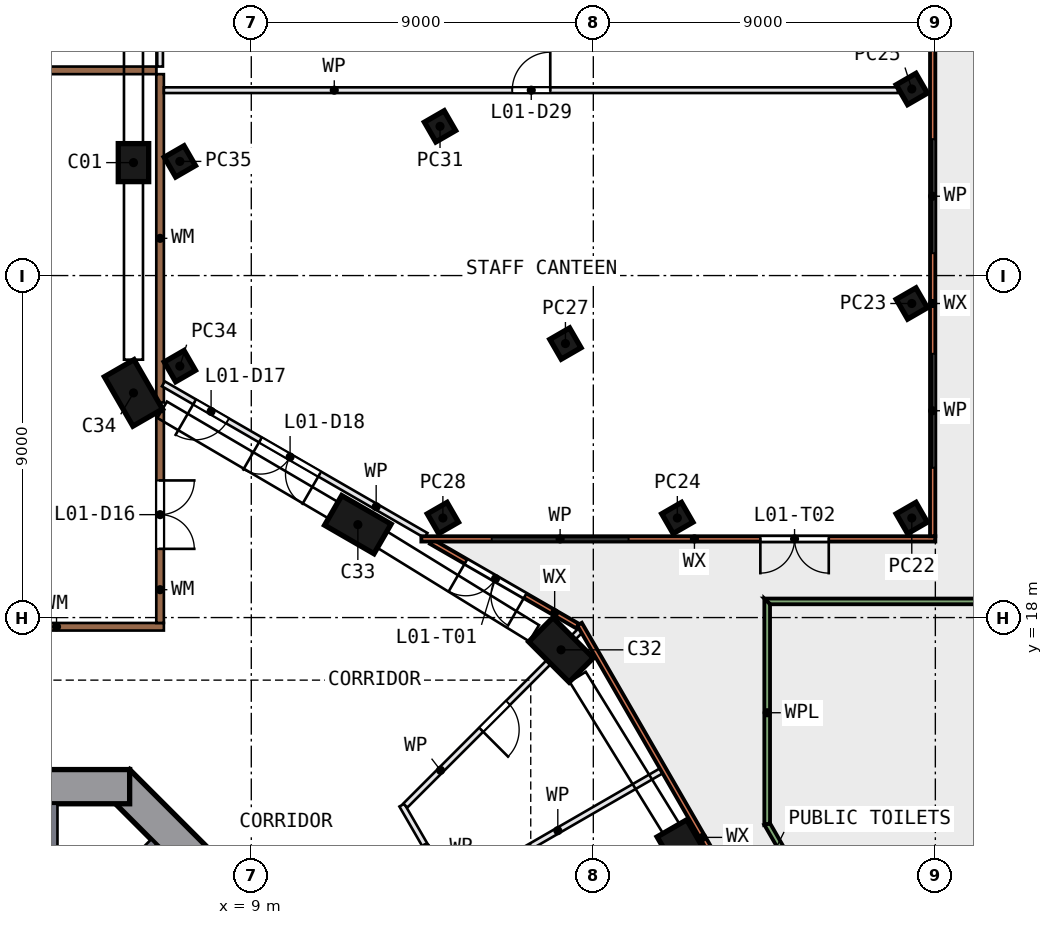
"""IFC4 building model, lengths in metres.
Left out: names, types, materials, properties, quantities, classifications, styles, units other than length and angle.
Written with IfcOpenShell. Run it as: python <this file> out.ifc"""

import sys

from ifc_helpers import new_model, si_unit, direction, frame, frame_2d, origin, origin_2d, place, context, subcontext, project, spatial, polyline, rectangle, outline, extrude, element, fill, save


model = new_model("IFC4")
c1 = context("Model", 3, precision=1e-05, world=origin(), true_north=direction((0.0, 1.0)))
c2 = subcontext(c1, "Body", "Model", "MODEL_VIEW")
j1 = project(units=[si_unit("LENGTHUNIT", "METRE"), si_unit("PLANEANGLEUNIT", "RADIAN")], contexts=[c1])
p1 = place(None, origin())
s1 = spatial("IfcSite", under=j1, at=p1, CompositionType="ELEMENT")
p2 = place(p1, origin())
s2 = spatial("IfcBuilding", under=s1, at=p2, CompositionType="ELEMENT")
p3 = place(p2, frame((0.0, 0.0, 8.0)))
s3 = spatial("IfcBuildingStorey", under=s2, at=p3, CompositionType="ELEMENT", Elevation=8.0)
p4 = place(p3, frame((5.9, 29.972, 0.0), z_axis=(0.0, 0.0, 1.0), x_axis=(0.0, 1.0, 0.0)))
e1 = element("IfcColumn", 1, at=p4, inside=s3, PredefinedType="COLUMN", context=c2, shape_type="SweptSolid", body=[
    extrude(rectangle(XDim=1.0, YDim=0.8, at=origin_2d()), origin(), (0.0, 0.0, 1.0), 5.55),
])
for number, where, z_axis, x_axis in (
    (2, (20.445, 11.804, 0.0), (0.0, 0.0, 1.0), (-0.5, 0.866, 0.0)),
    (3, (17.151, 17.151, 0.0), (0.0, 0.0, 1.0), (0.707, -0.707, 0.0)),
    (4, (11.804, 20.445, 0.0), (0.0, 0.0, 1.0), (-0.866, 0.5, 0.0)),
    (5, (5.9, 23.912, 0.0), (0.0, 0.0, 1.0), (0.5, -0.866, 0.0)),
):
    element("IfcColumn", number, at=place(p3, frame(where, z_axis=z_axis, x_axis=x_axis)), inside=s3, PredefinedType="COLUMN", context=c2, shape_type="SweptSolid", body=[
        extrude(rectangle(XDim=1.5, YDim=0.9, at=origin_2d()), origin(), (0.0, 0.0, 1.0), 5.55),
    ])
p5 = place(p3, frame((13.682, 5.481, 0.0), z_axis=(0.0, 0.0, 1.0), x_axis=(-0.707106781, 0.707106781, 0.0)))
e6 = element("IfcWall", 6, at=p5, inside=s3, PredefinedType="SHEAR", context=c2, shape_type="SweptSolid", body=[
    extrude(rectangle(XDim=11.598, YDim=0.9, at=frame_2d((5.799, 0.0))), origin(), (0.0, 0.0, 1.0), 6.0),
])
p6 = place(p5, frame((2.099, 0.0, 0.0)))
e7 = element("IfcOpeningElement", 7, at=p6, cuts=e6, PredefinedType="OPENING", context=c2, shape_type="SweptSolid", body=[
    extrude(rectangle(XDim=1.2, YDim=2.1, at=frame_2d((0.6, 1.05))), frame((0.0, 0.46, 0.0), z_axis=(0.0, -1.0, 0.0), x_axis=(1.0, 0.0, 0.0)), (0.0, 0.0, 1.0), 0.92),
])
p7 = place(p3, frame((5.799, 13.55, 0.0), z_axis=(0.0, 0.0, 1.0), x_axis=(-1.0, 0.0, 0.0)))
e8 = element("IfcWall", 8, at=p7, inside=s3, PredefinedType="SHEAR", context=c2, shape_type="SweptSolid", body=[
    extrude(rectangle(XDim=11.598, YDim=0.9, at=frame_2d((5.799, 0.0))), origin(), (0.0, 0.0, 1.0), 6.0),
])
p8 = place(p7, frame((4.899, 0.0, 0.0)))
e9 = element("IfcOpeningElement", 9, at=p8, cuts=e8, PredefinedType="OPENING", context=c2, shape_type="SweptSolid", body=[
    extrude(rectangle(XDim=1.8, YDim=2.1, at=frame_2d((0.9, 1.05))), frame((0.0, 0.46, 0.0), z_axis=(0.0, -1.0, 0.0), x_axis=(1.0, 0.0, 0.0)), (0.0, 0.0, 1.0), 0.92),
])
for number, where, z_axis, x_axis in (
    (10, (26.38, 20.62, 0.0), (0.0, 0.0, 1.0), (0.866, 0.5, 0.0)),
    (11, (26.38, 26.265, 0.0), (0.0, 0.0, 1.0), (0.866, 0.5, 0.0)),
    (12, (20.211, 20.62, 0.0), (0.0, 0.0, 1.0), (0.866, 0.5, 0.0)),
    (13, (26.38, 31.91, 0.0), (0.0, 0.0, 1.0), (0.866, 0.5, 0.0)),
    (14, (17.266, 25.211, 0.0), (0.0, 0.0, 1.0), (0.866, 0.5, 0.0)),
    (15, (14.042, 20.62, 0.0), (0.0, 0.0, 1.0), (0.866, 0.5, 0.0)),
    (16, (13.966, 30.927, 0.0), (0.0, 0.0, 1.0), (0.866, 0.5, 0.0)),
    (17, (7.12, 24.616, 0.0), (0.0, 0.0, 1.0), (0.866, 0.5, 0.0)),
    (18, (7.12, 30.004, 0.0), (0.0, 0.0, 1.0), (0.866, 0.5, 0.0)),
):
    element("IfcColumn", number, at=place(p3, frame(where, z_axis=z_axis, x_axis=x_axis)), inside=s3, PredefinedType="COLUMN", context=c2, shape_type="SweptSolid", body=[
        extrude(rectangle(XDim=0.6, YDim=0.6, at=origin_2d()), origin(), (0.0, 0.0, 1.0), 6.0),
    ])
p9 = place(p3, frame((24.118, 6.603, 0.0), z_axis=(0.0, 0.0, 1.0), x_axis=(-0.499997984, 0.866026568, 0.0)))
e19 = element("IfcWall", 19, at=p9, inside=s3, PredefinedType="SOLIDWALL", context=c2, shape_type="SweptSolid", body=[
    extrude(rectangle(XDim=12.962, YDim=0.14, at=frame_2d((6.481, 0.0))), origin(), (0.0, 0.0, 1.0), 5.55),
])
p10 = place(p3, frame((17.586, 17.777, 0.0), z_axis=(0.0, 0.0, 1.0), x_axis=(-0.866020975, 0.500007671, 0.0)))
e20 = element("IfcWall", 20, at=p10, inside=s3, PredefinedType="SOLIDWALL", context=c2, shape_type="SweptSolid", body=[
    extrude(rectangle(XDim=4.446, YDim=0.14, at=frame_2d((2.223, 0.0))), origin(), (0.0, 0.0, 1.0), 5.55),
])
p11 = place(p10, frame((1.593, 0.0, 0.0)))
e21 = element("IfcOpeningElement", 21, at=p11, cuts=e20, PredefinedType="OPENING", context=c2, shape_type="SweptSolid", body=[
    extrude(rectangle(XDim=1.8, YDim=2.4, at=frame_2d((0.9, 1.2))), frame((0.0, 0.08, 0.0), z_axis=(0.0, -1.0, 0.0), x_axis=(1.0, 0.0, 0.0)), (0.0, 0.0, 1.0), 0.16),
])
p12 = place(p3, frame((27.0, 20.07, 0.0), z_axis=(0.0, 0.0, 1.0), x_axis=(-1.0, 0.0, 0.0)))
e22 = element("IfcWall", 22, at=p12, inside=s3, PredefinedType="SOLIDWALL", context=c2, shape_type="SweptSolid", body=[
    extrude(rectangle(XDim=13.526, YDim=0.14, at=frame_2d((6.763, 0.0))), origin(), (0.0, 0.0, 1.0), 5.55),
])
p13 = place(p12, frame((8.073, 0.0, 0.9)))
e23 = element("IfcOpeningElement", 23, at=p13, cuts=e22, PredefinedType="OPENING", context=c2, shape_type="SweptSolid", body=[
    extrude(rectangle(XDim=3.6, YDim=3.6, at=frame_2d((1.8, 1.8))), frame((0.0, 0.08, 0.0), z_axis=(0.0, -1.0, 0.0), x_axis=(1.0, 0.0, 0.0)), (0.0, 0.0, 1.0), 0.16),
])
p14 = place(p12, frame((2.805, 0.0, 0.0)))
e24 = element("IfcOpeningElement", 24, at=p14, cuts=e22, PredefinedType="OPENING", context=c2, shape_type="SweptSolid", body=[
    extrude(rectangle(XDim=1.8, YDim=2.4, at=frame_2d((0.9, 1.2))), frame((0.0, 0.08, 0.0), z_axis=(0.0, -1.0, 0.0), x_axis=(1.0, 0.0, 0.0)), (0.0, 0.0, 1.0), 0.16),
])
p15 = place(p3, frame((26.93, 20.14, 0.0), z_axis=(0.0, 0.0, 1.0), x_axis=(0.0, 1.0, 0.0)))
e25 = element("IfcWall", 25, at=p15, inside=s3, PredefinedType="SOLIDWALL", context=c2, shape_type="SweptSolid", body=[
    extrude(rectangle(XDim=17.786, YDim=0.14, at=frame_2d((8.893, 0.0))), origin(), (0.0, 0.0, 1.0), 5.55),
])
p16 = place(p15, frame((1.802, 0.0, 0.9)))
e26 = element("IfcOpeningElement", 26, at=p16, cuts=e25, PredefinedType="OPENING", context=c2, shape_type="SweptSolid", body=[
    extrude(rectangle(XDim=3.0, YDim=3.6, at=frame_2d((1.5, 1.8))), frame((0.0, 0.08, 0.0), z_axis=(0.0, -1.0, 0.0), x_axis=(1.0, 0.0, 0.0)), (0.0, 0.0, 1.0), 0.16),
])
p17 = place(p15, frame((7.448, 0.0, 0.9)))
e27 = element("IfcOpeningElement", 27, at=p17, cuts=e25, PredefinedType="OPENING", context=c2, shape_type="SweptSolid", body=[
    extrude(rectangle(XDim=3.0, YDim=3.6, at=frame_2d((1.5, 1.8))), frame((0.0, 0.08, 0.0), z_axis=(0.0, -1.0, 0.0), x_axis=(1.0, 0.0, 0.0)), (0.0, 0.0, 1.0), 0.16),
])
p18 = place(p15, frame((13.092, 0.0, 0.9)))
e28 = element("IfcOpeningElement", 28, at=p18, cuts=e25, PredefinedType="OPENING", context=c2, shape_type="SweptSolid", body=[
    extrude(rectangle(XDim=3.0, YDim=3.6, at=frame_2d((1.5, 1.8))), frame((0.0, 0.08, 0.0), z_axis=(0.0, -1.0, 0.0), x_axis=(1.0, 0.0, 0.0)), (0.0, 0.0, 1.0), 0.16),
])
p19 = place(p3, origin())
e29 = element("IfcWall", 29, at=p19, inside=s3, PredefinedType="SOLIDWALL", context=c2, shape_type="SweptSolid", body=[
    extrude(outline(polyline([(22.5, 12.545), (23.104, 11.5), (23.19, 11.65), (22.65, 12.586), (22.5, 12.545)])), origin(), (0.0, 0.0, 1.0), 0.6),
])
p20 = place(p3, origin())
e30 = element("IfcWall", 30, at=p20, inside=s3, PredefinedType="SOLIDWALL", context=c2, shape_type="SweptSolid", body=[
    extrude(outline(polyline([(28.5, 18.5), (22.5, 18.5), (22.65, 18.35), (28.65, 18.35), (28.5, 18.5)])), origin(), (0.0, 0.0, 1.0), 0.6),
])
p21 = place(p3, origin())
e31 = element("IfcWall", 31, at=p21, inside=s3, PredefinedType="SOLIDWALL", context=c2, shape_type="SweptSolid", body=[
    extrude(outline(polyline([(22.5, 18.5), (22.5, 12.545), (22.65, 12.586), (22.65, 18.35), (22.5, 18.5)])), origin(), (0.0, 0.0, 1.0), 0.6),
])
p22 = place(p3, origin())
e32 = element("IfcWall", 32, at=p22, inside=s3, PredefinedType="SOLIDWALL", context=c2, shape_type="SweptSolid", body=[
    extrude(outline(polyline([(3.9, 13.1), (3.9, 10.9), (3.7, 10.9), (3.7, 12.9), (1.4, 12.9), (1.4, 10.9), (1.2, 10.9), (1.2, 13.1), (3.9, 13.1)])), origin(), (0.0, 0.0, 1.0), 5.55),
])
p23 = place(p3, frame((3.677, 9.334, 0.0), z_axis=(0.0, 0.0, 1.0), x_axis=(0.707106781, 0.707106781, 0.0)))
e33 = element("IfcWall", 33, at=p23, inside=s3, PredefinedType="SOLIDWALL", context=c2, shape_type="SweptSolid", body=[
    extrude(rectangle(XDim=3.9, YDim=0.2, at=frame_2d((1.95, 0.0))), origin(), (0.0, 0.0, 1.0), 5.55),
])
p24 = place(p3, frame((6.7, 17.758, 0.0), z_axis=(0.0, 0.0, 1.0), x_axis=(-1.0, 0.0, 0.0)))
e34 = element("IfcWall", 34, at=p24, inside=s3, PredefinedType="SOLIDWALL", context=c2, shape_type="SweptSolid", body=[
    extrude(rectangle(XDim=13.2, YDim=0.2, at=frame_2d((6.6, 0.0))), origin(), (0.0, 0.0, 1.0), 5.55),
])
p25 = place(p24, frame((5.85, 0.0, 0.0)))
e35 = element("IfcOpeningElement", 35, at=p25, cuts=e34, PredefinedType="OPENING", context=c2, shape_type="SweptSolid", body=[
    extrude(rectangle(XDim=1.8, YDim=2.1, at=frame_2d((0.9, 1.05))), frame((0.0, 0.11, 0.0), z_axis=(0.0, -1.0, 0.0), x_axis=(1.0, 0.0, 0.0)), (0.0, 0.0, 1.0), 0.22),
])
p26 = place(p3, frame((6.6, 23.415, 0.0), z_axis=(0.0, 0.0, 1.0), x_axis=(0.0, -1.0, 0.0)))
e36 = element("IfcWall", 36, at=p26, inside=s3, PredefinedType="SOLIDWALL", context=c2, shape_type="SweptSolid", body=[
    extrude(rectangle(XDim=5.557, YDim=0.2, at=frame_2d((2.778, 0.0))), origin(), (0.0, 0.0, 1.0), 5.55),
])
p27 = place(p26, frame((1.807, 0.0, 0.0)))
e37 = element("IfcOpeningElement", 37, at=p27, cuts=e36, PredefinedType="OPENING", context=c2, shape_type="SweptSolid", body=[
    extrude(rectangle(XDim=1.8, YDim=2.1, at=frame_2d((0.9, 1.05))), frame((0.0, 0.11, 0.0), z_axis=(0.0, -1.0, 0.0), x_axis=(1.0, 0.0, 0.0)), (0.0, 0.0, 1.0), 0.22),
])
p28 = place(p3, frame((6.6, 23.659, 0.0), z_axis=(0.0, 0.0, 1.0), x_axis=(0.0, 1.0, 0.0)))
e38 = element("IfcWall", 38, at=p28, inside=s3, PredefinedType="SOLIDWALL", context=c2, shape_type="SweptSolid", body=[
    extrude(rectangle(XDim=8.641, YDim=0.2, at=frame_2d((4.32, 0.0))), origin(), (0.0, 0.0, 1.0), 5.55),
])
p29 = place(p3, frame((13.598, 20.16, 0.0), z_axis=(0.0, 0.0, 1.0), x_axis=(-0.866016972, 0.500014603, 0.0)))
e39 = element("IfcWall", 39, at=p29, inside=s3, PredefinedType="PARTITIONING", context=c2, shape_type="SweptSolid", body=[
    extrude(rectangle(XDim=7.981, YDim=0.15, at=frame_2d((3.991, 0.0))), origin(), (0.0, 0.0, 1.0), 5.55),
])
p30 = place(p29, frame((6.031, 0.0, 0.0)))
e40 = element("IfcOpeningElement", 40, at=p30, cuts=e39, PredefinedType="OPENING", context=c2, shape_type="SweptSolid", body=[
    extrude(rectangle(XDim=1.0, YDim=2.1, at=frame_2d((0.5, 1.05))), frame((0.0, 0.085, 0.0), z_axis=(0.0, -1.0, 0.0), x_axis=(1.0, 0.0, 0.0)), (0.0, 0.0, 1.0), 0.17),
])
p31 = place(p29, frame((3.231, 0.0, 0.0)))
e41 = element("IfcOpeningElement", 41, at=p31, cuts=e39, PredefinedType="OPENING", context=c2, shape_type="SweptSolid", body=[
    extrude(rectangle(XDim=1.8, YDim=2.1, at=frame_2d((0.9, 1.05))), frame((0.0, 0.085, 0.0), z_axis=(0.0, -1.0, 0.0), x_axis=(1.0, 0.0, 0.0)), (0.0, 0.0, 1.0), 0.17),
])
p32 = place(p3, frame((6.5, 32.4, 0.0), z_axis=(0.0, 0.0, 1.0), x_axis=(-1.0, 0.0, 0.0)))
e42 = element("IfcWall", 42, at=p32, inside=s3, PredefinedType="SOLIDWALL", context=c2, shape_type="SweptSolid", body=[
    extrude(rectangle(XDim=12.86, YDim=0.2, at=frame_2d((6.43, 0.0))), origin(), (0.0, 0.0, 1.0), 5.55),
])
p33 = place(p3, frame((6.6, 32.5, 0.0), z_axis=(0.0, 0.0, 1.0), x_axis=(0.0, 1.0, 0.0)))
e43 = element("IfcWall", 43, at=p33, inside=s3, PredefinedType="PARTITIONING", context=c2, shape_type="SweptSolid", body=[
    extrude(rectangle(XDim=2.025, YDim=0.15, at=frame_2d((1.013, 0.0))), origin(), (0.0, 0.0, 1.0), 5.55),
])
p34 = place(p3, frame((12.962, 13.065, 0.0), z_axis=(0.0, 0.0, 1.0), x_axis=(0.499997778, -0.866026686, 0.0)))
e44 = element("IfcWall", 44, at=p34, inside=s3, PredefinedType="PARTITIONING", context=c2, shape_type="SweptSolid", body=[
    extrude(rectangle(XDim=2.559, YDim=0.15, at=frame_2d((1.279, 0.0))), origin(), (0.0, 0.0, 1.0), 5.55),
])
p35 = place(p3, frame((17.7, 17.7, 0.0), z_axis=(0.0, 0.0, 1.0), x_axis=(-0.707106781, -0.707106781, 0.0)))
e45 = element("IfcWall", 45, at=p35, inside=s3, PredefinedType="PARTITIONING", context=c2, shape_type="SweptSolid", body=[
    extrude(rectangle(XDim=6.572, YDim=0.15, at=frame_2d((3.286, 0.0))), origin(), (0.0, 0.0, 1.0), 5.55),
])
p36 = place(p35, frame((2.75, 0.0, 0.0)))
e46 = element("IfcOpeningElement", 46, at=p36, cuts=e45, PredefinedType="OPENING", context=c2, shape_type="SweptSolid", body=[
    extrude(rectangle(XDim=1.0, YDim=2.1, at=frame_2d((0.5, 1.05))), frame((0.0, 0.085, 0.0), z_axis=(0.0, -1.0, 0.0), x_axis=(1.0, 0.0, 0.0)), (0.0, 0.0, 1.0), 0.17),
])
p37 = place(p3, frame((19.787, 13.964, 0.0), z_axis=(0.0, 0.0, 1.0), x_axis=(-0.866042631, -0.49997016, 0.0)))
e47 = element("IfcWall", 47, at=p37, inside=s3, PredefinedType="PARTITIONING", context=c2, shape_type="SweptSolid", body=[
    extrude(rectangle(XDim=6.285, YDim=0.15, at=frame_2d((3.143, 0.0))), origin(), (0.0, 0.0, 1.0), 5.55),
])
p38 = place(p3, frame((6.7, 31.878, 0.0), z_axis=(0.0, 0.0, 1.0), x_axis=(1.0, 0.0, 0.0)))
e48 = element("IfcWall", 48, at=p38, inside=s3, PredefinedType="PARTITIONING", context=c2, shape_type="SweptSolid", body=[
    extrude(rectangle(XDim=19.317, YDim=0.15, at=frame_2d((9.659, 0.0))), origin(), (0.0, 0.0, 1.0), 5.55),
])
p39 = place(p38, frame((9.167, 0.0, 0.0)))
e49 = element("IfcOpeningElement", 49, at=p39, cuts=e48, PredefinedType="OPENING", context=c2, shape_type="SweptSolid", body=[
    extrude(rectangle(XDim=1.0, YDim=2.1, at=frame_2d((0.5, 1.05))), frame((0.0, 0.085, 0.0), z_axis=(0.0, -1.0, 0.0), x_axis=(1.0, 0.0, 0.0)), (0.0, 0.0, 1.0), 0.17),
])
p40 = place(p11, origin())
e50 = element("IfcDoor", 50, at=p40, inside=s3, OperationType="DOUBLE_DOOR_SINGLE_SWING", PredefinedType="DOOR", context=c2, shape_type="SweptSolid", body=[
    extrude(rectangle(XDim=1.8, YDim=2.4, at=frame_2d((0.9, 1.2))), frame((0.0, 0.025, 0.0), z_axis=(0.0, -1.0, 0.0), x_axis=(1.0, 0.0, 0.0)), (0.0, 0.0, 1.0), 0.05),
])
fill(e21, e50)
p41 = place(p13, origin())
e51 = element("IfcWindow", 51, at=p41, inside=s3, PartitioningType="SINGLE_PANEL", PredefinedType="WINDOW", context=c2, shape_type="SweptSolid", body=[
    extrude(rectangle(XDim=3.6, YDim=3.6, at=frame_2d((1.8, 1.8))), frame((0.0, 0.03, 0.0), z_axis=(0.0, -1.0, 0.0), x_axis=(1.0, 0.0, 0.0)), (0.0, 0.0, 1.0), 0.06),
])
fill(e23, e51)
p42 = place(p14, origin())
e52 = element("IfcDoor", 52, at=p42, inside=s3, OperationType="DOUBLE_DOOR_SINGLE_SWING", PredefinedType="DOOR", context=c2, shape_type="SweptSolid", body=[
    extrude(rectangle(XDim=1.8, YDim=2.4, at=frame_2d((0.9, 1.2))), frame((0.0, 0.025, 0.0), z_axis=(0.0, -1.0, 0.0), x_axis=(1.0, 0.0, 0.0)), (0.0, 0.0, 1.0), 0.05),
])
fill(e24, e52)
p43 = place(p16, origin())
e53 = element("IfcWindow", 53, at=p43, inside=s3, PartitioningType="SINGLE_PANEL", PredefinedType="WINDOW", context=c2, shape_type="SweptSolid", body=[
    extrude(rectangle(XDim=3.0, YDim=3.6, at=frame_2d((1.5, 1.8))), frame((0.0, 0.03, 0.0), z_axis=(0.0, -1.0, 0.0), x_axis=(1.0, 0.0, 0.0)), (0.0, 0.0, 1.0), 0.06),
])
fill(e26, e53)
p44 = place(p17, origin())
e54 = element("IfcWindow", 54, at=p44, inside=s3, PartitioningType="SINGLE_PANEL", PredefinedType="WINDOW", context=c2, shape_type="SweptSolid", body=[
    extrude(rectangle(XDim=3.0, YDim=3.6, at=frame_2d((1.5, 1.8))), frame((0.0, 0.03, 0.0), z_axis=(0.0, -1.0, 0.0), x_axis=(1.0, 0.0, 0.0)), (0.0, 0.0, 1.0), 0.06),
])
fill(e27, e54)
p45 = place(p27, origin())
e55 = element("IfcDoor", 55, at=p45, inside=s3, OperationType="DOUBLE_DOOR_SINGLE_SWING", PredefinedType="DOOR", context=c2, shape_type="SweptSolid", body=[
    extrude(rectangle(XDim=1.8, YDim=2.1, at=frame_2d((0.9, 1.05))), frame((0.0, 0.025, 0.0), z_axis=(0.0, -1.0, 0.0), x_axis=(1.0, 0.0, 0.0)), (0.0, 0.0, 1.0), 0.05),
])
fill(e37, e55)
p46 = place(p30, origin())
e56 = element("IfcDoor", 56, at=p46, inside=s3, OperationType="SINGLE_SWING_RIGHT", PredefinedType="DOOR", context=c2, shape_type="SweptSolid", body=[
    extrude(rectangle(XDim=1.0, YDim=2.1, at=frame_2d((0.5, 1.05))), frame((0.0, 0.025, 0.0), z_axis=(0.0, -1.0, 0.0), x_axis=(1.0, 0.0, 0.0)), (0.0, 0.0, 1.0), 0.05),
])
fill(e40, e56)
p47 = place(p31, origin())
e57 = element("IfcDoor", 57, at=p47, inside=s3, OperationType="DOUBLE_DOOR_SINGLE_SWING", PredefinedType="DOOR", context=c2, shape_type="SweptSolid", body=[
    extrude(rectangle(XDim=1.8, YDim=2.1, at=frame_2d((0.9, 1.05))), frame((0.0, 0.025, 0.0), z_axis=(0.0, -1.0, 0.0), x_axis=(1.0, 0.0, 0.0)), (0.0, 0.0, 1.0), 0.05),
])
fill(e41, e57)
p48 = place(p36, origin())
e58 = element("IfcDoor", 58, at=p48, inside=s3, OperationType="SINGLE_SWING_RIGHT", PredefinedType="DOOR", context=c2, shape_type="SweptSolid", body=[
    extrude(rectangle(XDim=1.0, YDim=2.1, at=frame_2d((0.5, 1.05))), frame((0.0, 0.025, 0.0), z_axis=(0.0, -1.0, 0.0), x_axis=(1.0, 0.0, 0.0)), (0.0, 0.0, 1.0), 0.05),
])
fill(e46, e58)
p49 = place(p39, origin())
e59 = element("IfcDoor", 59, at=p49, inside=s3, OperationType="SINGLE_SWING_RIGHT", PredefinedType="DOOR", context=c2, shape_type="SweptSolid", body=[
    extrude(rectangle(XDim=1.0, YDim=2.1, at=frame_2d((0.5, 1.05))), frame((0.0, 0.025, 0.0), z_axis=(0.0, -1.0, 0.0), x_axis=(1.0, 0.0, 0.0)), (0.0, 0.0, 1.0), 0.05),
])
fill(e49, e59)
save(model, sys.argv[1])
